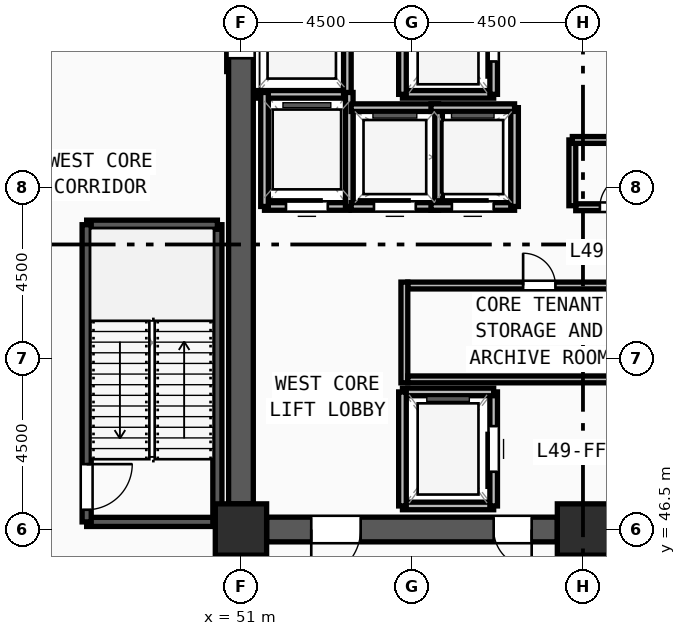
"""IFC4 building model, lengths in metres.
Left out: names, types, materials, properties, quantities, classifications, styles, units other than length and angle.
Written with IfcOpenShell. Run it as: python <this file> out.ifc"""

import sys

from ifc_helpers import new_model, si_unit, direction, frame, frame_2d, origin, origin_2d, place, context, subcontext, project, spatial, rectangle, extrude, source, transform, mapped, element, fill, save


model = new_model("IFC4")
c1 = context("Model", 3, precision=1e-05, world=origin(), true_north=direction((0.0, 1.0)))
c2 = subcontext(c1, "Body", "Model", "MODEL_VIEW")
j1 = project(units=[si_unit("LENGTHUNIT", "METRE"), si_unit("PLANEANGLEUNIT", "RADIAN")], contexts=[c1])
p1 = place(None, origin())
s1 = spatial("IfcSite", under=j1, at=p1, CompositionType="ELEMENT")
p2 = place(p1, origin())
s2 = spatial("IfcBuilding", under=s1, at=p2, CompositionType="ELEMENT")
p3 = place(p2, frame((0.0, 0.0, 189.75)))
s3 = spatial("IfcBuildingStorey", under=s2, at=p3, CompositionType="ELEMENT", Elevation=189.75)
m1 = source(origin(), c2, "Body", "SweptSolid", [
    extrude(rectangle(XDim=1.35, YDim=1.35, at=origin_2d()), origin(), (0.0, 0.0, 1.0), 4.5),
])
for number, where, z_axis, x_axis in (
    (1, (51.0, 46.5, 0.0), (0.0, 0.0, 1.0), (1.0, 0.0, 0.0)),
    (2, (60.0, 46.5, 0.0), (0.0, 0.0, 1.0), (1.0, 0.0, 0.0)),
):
    element("IfcColumn", number, at=place(p3, frame(where, z_axis=z_axis, x_axis=x_axis)), inside=s3, PredefinedType="COLUMN", context=c2, shape_type="MappedRepresentation", body=[
        mapped(m1, transform((0.0, 0.0, 0.0), x_axis=(1.0, 0.0, 0.0), y_axis=(0.0, 1.0, 0.0), z_axis=(0.0, 0.0, 1.0), scale=1.0)),
    ])
p4 = place(p3, frame((59.325, 46.5, 0.0), z_axis=(0.0, 0.0, 1.0), x_axis=(-1.0, 0.0, 0.0)))
e3 = element("IfcWall", 3, at=p4, inside=s3, PredefinedType="SHEAR", context=c2, shape_type="SweptSolid", body=[
    extrude(rectangle(XDim=7.65, YDim=0.65, at=frame_2d((3.825, 0.0))), origin(), (0.0, 0.0, 1.0), 4.32),
])
m2 = source(origin(), c2, "Body", "SweptSolid", [
    extrude(rectangle(XDim=1.3, YDim=2.2, at=frame_2d((0.65, 1.1))), frame((0.0, 0.335, 0.0), z_axis=(0.0, -1.0, 0.0), x_axis=(1.0, 0.0, 0.0)), (0.0, 0.0, 1.0), 0.67),
])
p5 = place(p4, frame((5.175, 0.0, 0.0)))
e4 = element("IfcOpeningElement", 4, at=p5, cuts=e3, PredefinedType="OPENING", context=c2, shape_type="MappedRepresentation", body=[
    mapped(m2, transform((0.0, 0.0, 0.0), x_axis=(1.0, 0.0, 0.0), y_axis=(0.0, 1.0, 0.0), z_axis=(0.0, 0.0, 1.0), scale=1.0)),
])
m3 = source(origin(), c2, "Body", "SweptSolid", [
    extrude(rectangle(XDim=1.0, YDim=2.2, at=frame_2d((0.5, 1.1))), frame((0.0, 0.335, 0.0), z_axis=(0.0, -1.0, 0.0), x_axis=(1.0, 0.0, 0.0)), (0.0, 0.0, 1.0), 0.67),
])
p6 = place(p4, frame((0.675, 0.0, 0.0)))
e5 = element("IfcOpeningElement", 5, at=p6, cuts=e3, PredefinedType="OPENING", context=c2, shape_type="MappedRepresentation", body=[
    mapped(m3, transform((0.0, 0.0, 0.0), x_axis=(1.0, 0.0, 0.0), y_axis=(0.0, 1.0, 0.0), z_axis=(0.0, 0.0, 1.0), scale=1.0)),
])
p7 = place(p3, frame((51.0, 47.175, 0.0), z_axis=(0.0, 0.0, 1.0), x_axis=(0.0, 1.0, 0.0)))
e6 = element("IfcWall", 6, at=p7, inside=s3, PredefinedType="SHEAR", context=c2, shape_type="SweptSolid", body=[
    extrude(rectangle(XDim=13.65, YDim=0.65, at=frame_2d((6.825, 0.0))), origin(), (0.0, 0.0, 1.0), 4.32),
])
m4 = source(origin(), c2, "Body", "SweptSolid", [
    extrude(rectangle(XDim=1.1, YDim=2.2, at=frame_2d((0.55, 1.1))), frame((0.0, 0.335, 0.0), z_axis=(0.0, -1.0, 0.0), x_axis=(1.0, 0.0, 0.0)), (0.0, 0.0, 1.0), 0.67),
])
p8 = place(p7, frame((11.725, 0.0, 0.0)))
e7 = element("IfcOpeningElement", 7, at=p8, cuts=e6, PredefinedType="OPENING", context=c2, shape_type="MappedRepresentation", body=[
    mapped(m4, transform((0.0, 0.0, 0.0), x_axis=(1.0, 0.0, 0.0), y_axis=(0.0, 1.0, 0.0), z_axis=(0.0, 0.0, 1.0), scale=1.0)),
])
p9 = place(p3, frame((46.94, 46.7, 0.0), z_axis=(0.0, 0.0, 1.0), x_axis=(1.0, 0.0, 0.0)))
e8 = element("IfcWall", 8, at=p9, inside=s3, PredefinedType="SOLIDWALL", context=c2, shape_type="SweptSolid", body=[
    extrude(rectangle(XDim=3.44, YDim=0.24, at=frame_2d((1.72, 0.0))), origin(), (0.0, 0.0, 1.0), 4.32),
])
p10 = place(p3, frame((50.38, 46.7, 0.0), z_axis=(0.0, 0.0, 1.0), x_axis=(0.0, 1.0, 0.0)))
e9 = element("IfcWall", 9, at=p10, inside=s3, PredefinedType="SOLIDWALL", context=c2, shape_type="SweptSolid", body=[
    extrude(rectangle(XDim=7.82, YDim=0.24, at=frame_2d((3.91, 0.0))), origin(), (0.0, 0.0, 1.0), 4.32),
])
p11 = place(p3, frame((50.38, 54.52, 0.0), z_axis=(0.0, 0.0, 1.0), x_axis=(-1.0, 0.0, 0.0)))
e10 = element("IfcWall", 10, at=p11, inside=s3, PredefinedType="SOLIDWALL", context=c2, shape_type="SweptSolid", body=[
    extrude(rectangle(XDim=3.44, YDim=0.24, at=frame_2d((1.72, 0.0))), origin(), (0.0, 0.0, 1.0), 4.32),
])
p12 = place(p3, frame((46.94, 54.52, 0.0), z_axis=(0.0, 0.0, 1.0), x_axis=(0.0, -1.0, 0.0)))
e11 = element("IfcWall", 11, at=p12, inside=s3, PredefinedType="SOLIDWALL", context=c2, shape_type="SweptSolid", body=[
    extrude(rectangle(XDim=7.82, YDim=0.24, at=frame_2d((3.91, 0.0))), origin(), (0.0, 0.0, 1.0), 4.32),
])
m5 = source(origin(), c2, "Body", "SweptSolid", [
    extrude(rectangle(XDim=1.2, YDim=2.2, at=frame_2d((0.6, 1.1))), frame((0.0, 0.13, 0.0), z_axis=(0.0, -1.0, 0.0), x_axis=(1.0, 0.0, 0.0)), (0.0, 0.0, 1.0), 0.26),
])
p13 = place(p12, frame((6.3, 0.0, 0.0)))
e12 = element("IfcOpeningElement", 12, at=p13, cuts=e11, PredefinedType="OPENING", context=c2, shape_type="MappedRepresentation", body=[
    mapped(m5, transform((0.0, 0.0, 0.0), x_axis=(1.0, 0.0, 0.0), y_axis=(0.0, 1.0, 0.0), z_axis=(0.0, 0.0, 1.0), scale=1.0)),
])
p14 = place(p3, frame((55.25, 47.12, 0.0), z_axis=(0.0, 0.0, 1.0), x_axis=(1.0, 0.0, 0.0)))
e13 = element("IfcWall", 13, at=p14, inside=s3, PredefinedType="SOLIDWALL", context=c2, shape_type="SweptSolid", body=[
    extrude(rectangle(XDim=2.4, YDim=0.2, at=frame_2d((1.2, 0.0))), origin(), (0.0, 0.0, 1.0), 4.32),
])
p15 = place(p3, frame((57.65, 47.12, 0.0), z_axis=(0.0, 0.0, 1.0), x_axis=(0.0, 1.0, 0.0)))
e14 = element("IfcWall", 14, at=p15, inside=s3, PredefinedType="SOLIDWALL", context=c2, shape_type="SweptSolid", body=[
    extrude(rectangle(XDim=3.0, YDim=0.2, at=frame_2d((1.5, 0.0))), origin(), (0.0, 0.0, 1.0), 4.32),
])
m6 = source(origin(), c2, "Body", "SweptSolid", [
    extrude(rectangle(XDim=1.2, YDim=2.3, at=frame_2d((0.6, 1.15))), frame((0.0, 0.11, 0.0), z_axis=(0.0, -1.0, 0.0), x_axis=(1.0, 0.0, 0.0)), (0.0, 0.0, 1.0), 0.22),
])
p16 = place(p15, frame((0.9, 0.0, 0.0)))
e15 = element("IfcOpeningElement", 15, at=p16, cuts=e14, PredefinedType="OPENING", context=c2, shape_type="MappedRepresentation", body=[
    mapped(m6, transform((0.0, 0.0, 0.0), x_axis=(1.0, 0.0, 0.0), y_axis=(0.0, 1.0, 0.0), z_axis=(0.0, 0.0, 1.0), scale=1.0)),
])
p17 = place(p3, frame((57.65, 50.12, 0.0), z_axis=(0.0, 0.0, 1.0), x_axis=(-1.0, 0.0, 0.0)))
e16 = element("IfcWall", 16, at=p17, inside=s3, PredefinedType="SOLIDWALL", context=c2, shape_type="SweptSolid", body=[
    extrude(rectangle(XDim=2.4, YDim=0.2, at=frame_2d((1.2, 0.0))), origin(), (0.0, 0.0, 1.0), 4.32),
])
p18 = place(p3, frame((55.25, 50.12, 0.0), z_axis=(0.0, 0.0, 1.0), x_axis=(0.0, -1.0, 0.0)))
e17 = element("IfcWall", 17, at=p18, inside=s3, PredefinedType="SOLIDWALL", context=c2, shape_type="SweptSolid", body=[
    extrude(rectangle(XDim=3.0, YDim=0.2, at=frame_2d((1.5, 0.0))), origin(), (0.0, 0.0, 1.0), 4.32),
])
p19 = place(p3, frame((55.25, 57.95, 0.0), z_axis=(0.0, 0.0, 1.0), x_axis=(1.0, 0.0, 0.0)))
e18 = element("IfcWall", 18, at=p19, inside=s3, PredefinedType="SOLIDWALL", context=c2, shape_type="SweptSolid", body=[
    extrude(rectangle(XDim=2.4, YDim=0.2, at=frame_2d((1.2, 0.0))), origin(), (0.0, 0.0, 1.0), 4.32),
])
p20 = place(p3, frame((57.65, 57.95, 0.0), z_axis=(0.0, 0.0, 1.0), x_axis=(0.0, 1.0, 0.0)))
e19 = element("IfcWall", 19, at=p20, inside=s3, PredefinedType="SOLIDWALL", context=c2, shape_type="SweptSolid", body=[
    extrude(rectangle(XDim=2.93, YDim=0.2, at=frame_2d((1.465, 0.0))), origin(), (0.0, 0.0, 1.0), 4.32),
])
p21 = place(p20, frame((0.865, 0.0, 0.0)))
e20 = element("IfcOpeningElement", 20, at=p21, cuts=e19, PredefinedType="OPENING", context=c2, shape_type="MappedRepresentation", body=[
    mapped(m6, transform((0.0, 0.0, 0.0), x_axis=(1.0, 0.0, 0.0), y_axis=(0.0, 1.0, 0.0), z_axis=(0.0, 0.0, 1.0), scale=1.0)),
])
p22 = place(p3, frame((55.25, 60.88, 0.0), z_axis=(0.0, 0.0, 1.0), x_axis=(0.0, -1.0, 0.0)))
e21 = element("IfcWall", 21, at=p22, inside=s3, PredefinedType="SOLIDWALL", context=c2, shape_type="SweptSolid", body=[
    extrude(rectangle(XDim=2.93, YDim=0.2, at=frame_2d((1.465, 0.0))), origin(), (0.0, 0.0, 1.0), 4.32),
])
p23 = place(p3, frame((51.4, 57.95, 0.0), z_axis=(0.0, 0.0, 1.0), x_axis=(1.0, 0.0, 0.0)))
e22 = element("IfcWall", 22, at=p23, inside=s3, PredefinedType="SOLIDWALL", context=c2, shape_type="SweptSolid", body=[
    extrude(rectangle(XDim=2.4, YDim=0.2, at=frame_2d((1.2, 0.0))), origin(), (0.0, 0.0, 1.0), 4.32),
])
p24 = place(p3, frame((53.8, 57.95, 0.0), z_axis=(0.0, 0.0, 1.0), x_axis=(0.0, 1.0, 0.0)))
e23 = element("IfcWall", 23, at=p24, inside=s3, PredefinedType="SOLIDWALL", context=c2, shape_type="SweptSolid", body=[
    extrude(rectangle(XDim=2.93, YDim=0.2, at=frame_2d((1.465, 0.0))), origin(), (0.0, 0.0, 1.0), 4.32),
])
p25 = place(p3, frame((51.62, 55.0, 0.0), z_axis=(0.0, 0.0, 1.0), x_axis=(1.0, 0.0, 0.0)))
e24 = element("IfcWall", 24, at=p25, inside=s3, PredefinedType="SOLIDWALL", context=c2, shape_type="SweptSolid", body=[
    extrude(rectangle(XDim=2.23, YDim=0.2, at=frame_2d((1.115, 0.0))), origin(), (0.0, 0.0, 1.0), 4.32),
])
m7 = source(origin(), c2, "Body", "SweptSolid", [
    extrude(rectangle(XDim=1.1, YDim=2.2, at=frame_2d((0.55, 1.1))), frame((0.0, 0.11, 0.0), z_axis=(0.0, -1.0, 0.0), x_axis=(1.0, 0.0, 0.0)), (0.0, 0.0, 1.0), 0.22),
])
p26 = place(p25, frame((0.565, 0.0, 0.0)))
e25 = element("IfcOpeningElement", 25, at=p26, cuts=e24, PredefinedType="OPENING", context=c2, shape_type="MappedRepresentation", body=[
    mapped(m7, transform((0.0, 0.0, 0.0), x_axis=(1.0, 0.0, 0.0), y_axis=(0.0, 1.0, 0.0), z_axis=(0.0, 0.0, 1.0), scale=1.0)),
])
for number, where, z_axis, x_axis in (
    (26, (53.85, 55.0, 0.0), (0.0, 0.0, 1.0), (0.0, 1.0, 0.0)),
    (27, (51.62, 58.0, 0.0), (0.0, 0.0, 1.0), (0.0, -1.0, 0.0)),
):
    element("IfcWall", number, at=place(p3, frame(where, z_axis=z_axis, x_axis=x_axis)), inside=s3, PredefinedType="SOLIDWALL", context=c2, shape_type="SweptSolid", body=[
        extrude(rectangle(XDim=3.0, YDim=0.2, at=frame_2d((1.5, 0.0))), origin(), (0.0, 0.0, 1.0), 4.32),
    ])
p27 = place(p3, frame((53.9, 55.0, 0.0), z_axis=(0.0, 0.0, 1.0), x_axis=(1.0, 0.0, 0.0)))
e28 = element("IfcWall", 28, at=p27, inside=s3, PredefinedType="SOLIDWALL", context=c2, shape_type="SweptSolid", body=[
    extrude(rectangle(XDim=2.3, YDim=0.2, at=frame_2d((1.15, 0.0))), origin(), (0.0, 0.0, 1.0), 4.32),
])
p28 = place(p27, frame((0.6, 0.0, 0.0)))
e29 = element("IfcOpeningElement", 29, at=p28, cuts=e28, PredefinedType="OPENING", context=c2, shape_type="MappedRepresentation", body=[
    mapped(m7, transform((0.0, 0.0, 0.0), x_axis=(1.0, 0.0, 0.0), y_axis=(0.0, 1.0, 0.0), z_axis=(0.0, 0.0, 1.0), scale=1.0)),
])
p29 = place(p3, frame((56.2, 55.0, 0.0), z_axis=(0.0, 0.0, 1.0), x_axis=(0.0, 1.0, 0.0)))
e30 = element("IfcWall", 30, at=p29, inside=s3, PredefinedType="SOLIDWALL", context=c2, shape_type="SweptSolid", body=[
    extrude(rectangle(XDim=2.6, YDim=0.2, at=frame_2d((1.3, 0.0))), origin(), (0.0, 0.0, 1.0), 4.32),
])
p30 = place(p3, frame((56.2, 57.6, 0.0), z_axis=(0.0, 0.0, 1.0), x_axis=(-1.0, 0.0, 0.0)))
e31 = element("IfcWall", 31, at=p30, inside=s3, PredefinedType="SOLIDWALL", context=c2, shape_type="SweptSolid", body=[
    extrude(rectangle(XDim=2.3, YDim=0.2, at=frame_2d((1.15, 0.0))), origin(), (0.0, 0.0, 1.0), 4.32),
])
p31 = place(p3, frame((56.0, 55.0, 0.0), z_axis=(0.0, 0.0, 1.0), x_axis=(1.0, 0.0, 0.0)))
e32 = element("IfcWall", 32, at=p31, inside=s3, PredefinedType="SOLIDWALL", context=c2, shape_type="SweptSolid", body=[
    extrude(rectangle(XDim=2.2, YDim=0.2, at=frame_2d((1.1, 0.0))), origin(), (0.0, 0.0, 1.0), 4.32),
])
p32 = place(p31, frame((0.55, 0.0, 0.0)))
e33 = element("IfcOpeningElement", 33, at=p32, cuts=e32, PredefinedType="OPENING", context=c2, shape_type="MappedRepresentation", body=[
    mapped(m7, transform((0.0, 0.0, 0.0), x_axis=(1.0, 0.0, 0.0), y_axis=(0.0, 1.0, 0.0), z_axis=(0.0, 0.0, 1.0), scale=1.0)),
])
p33 = place(p3, frame((58.2, 55.0, 0.0), z_axis=(0.0, 0.0, 1.0), x_axis=(0.0, 1.0, 0.0)))
e34 = element("IfcWall", 34, at=p33, inside=s3, PredefinedType="SOLIDWALL", context=c2, shape_type="SweptSolid", body=[
    extrude(rectangle(XDim=2.6, YDim=0.2, at=frame_2d((1.3, 0.0))), origin(), (0.0, 0.0, 1.0), 4.32),
])
p34 = place(p3, frame((58.2, 57.6, 0.0), z_axis=(0.0, 0.0, 1.0), x_axis=(-1.0, 0.0, 0.0)))
e35 = element("IfcWall", 35, at=p34, inside=s3, PredefinedType="SOLIDWALL", context=c2, shape_type="SweptSolid", body=[
    extrude(rectangle(XDim=2.2, YDim=0.2, at=frame_2d((1.1, 0.0))), origin(), (0.0, 0.0, 1.0), 4.32),
])
p35 = place(p3, frame((55.39, 52.92, 0.0), z_axis=(0.0, 0.0, 1.0), x_axis=(1.0, 0.0, 0.0)))
e36 = element("IfcWall", 36, at=p35, inside=s3, PredefinedType="PARTITIONING", context=c2, shape_type="SweptSolid", body=[
    extrude(rectangle(XDim=6.91, YDim=0.18, at=frame_2d((3.455, 0.0))), origin(), (0.0, 0.0, 1.0), 4.32),
])
m8 = source(origin(), c2, "Body", "SweptSolid", [
    extrude(rectangle(XDim=0.85, YDim=2.1, at=frame_2d((0.425, 1.05))), frame((0.0, 0.1, 0.0), z_axis=(0.0, -1.0, 0.0), x_axis=(1.0, 0.0, 0.0)), (0.0, 0.0, 1.0), 0.2),
])
p36 = place(p35, frame((3.035, 0.0, 0.0)))
e37 = element("IfcOpeningElement", 37, at=p36, cuts=e36, PredefinedType="OPENING", context=c2, shape_type="MappedRepresentation", body=[
    mapped(m8, transform((0.0, 0.0, 0.0), x_axis=(1.0, 0.0, 0.0), y_axis=(0.0, 1.0, 0.0), z_axis=(0.0, 0.0, 1.0), scale=1.0)),
])
p37 = place(p3, frame((59.81, 54.98, 0.0), z_axis=(0.0, 0.0, 1.0), x_axis=(1.0, 0.0, 0.0)))
e38 = element("IfcWall", 38, at=p37, inside=s3, PredefinedType="PARTITIONING", context=c2, shape_type="SweptSolid", body=[
    extrude(rectangle(XDim=2.09, YDim=0.18, at=frame_2d((1.045, 0.0))), origin(), (0.0, 0.0, 1.0), 4.32),
])
p38 = place(p37, frame((0.635, 0.0, 0.0)))
e39 = element("IfcOpeningElement", 39, at=p38, cuts=e38, PredefinedType="OPENING", context=c2, shape_type="MappedRepresentation", body=[
    mapped(m8, transform((0.0, 0.0, 0.0), x_axis=(1.0, 0.0, 0.0), y_axis=(0.0, 1.0, 0.0), z_axis=(0.0, 0.0, 1.0), scale=1.0)),
])
p39 = place(p3, frame((59.72, 55.02, 0.0), z_axis=(0.0, 0.0, 1.0), x_axis=(0.0, 1.0, 0.0)))
e40 = element("IfcWall", 40, at=p39, inside=s3, PredefinedType="PARTITIONING", context=c2, shape_type="SweptSolid", body=[
    extrude(rectangle(XDim=1.73, YDim=0.18, at=frame_2d((0.865, 0.0))), origin(), (0.0, 0.0, 1.0), 4.32),
])
p40 = place(p3, frame((59.72, 56.75, 0.0), z_axis=(0.0, 0.0, 1.0), x_axis=(1.0, 0.0, 0.0)))
e41 = element("IfcWall", 41, at=p40, inside=s3, PredefinedType="PARTITIONING", context=c2, shape_type="SweptSolid", body=[
    extrude(rectangle(XDim=2.29, YDim=0.18, at=frame_2d((1.145, 0.0))), origin(), (0.0, 0.0, 1.0), 4.32),
])
p41 = place(p3, frame((55.3, 50.36, 0.0), z_axis=(0.0, 0.0, 1.0), x_axis=(0.0, 1.0, 0.0)))
e42 = element("IfcWall", 42, at=p41, inside=s3, PredefinedType="PARTITIONING", context=c2, shape_type="SweptSolid", body=[
    extrude(rectangle(XDim=2.65, YDim=0.18, at=frame_2d((1.325, 0.0))), origin(), (0.0, 0.0, 1.0), 4.32),
])
p42 = place(p3, frame((55.39, 50.45, 0.0), z_axis=(0.0, 0.0, 1.0), x_axis=(1.0, 0.0, 0.0)))
e43 = element("IfcWall", 43, at=p42, inside=s3, PredefinedType="PARTITIONING", context=c2, shape_type="SweptSolid", body=[
    extrude(rectangle(XDim=6.91, YDim=0.18, at=frame_2d((3.455, 0.0))), origin(), (0.0, 0.0, 1.0), 4.32),
])
m9 = source(origin(), c2, "Body", "SweptSolid", [
    extrude(rectangle(XDim=1.3, YDim=2.2, at=frame_2d((0.65, 1.1))), frame((0.0, 0.025, 0.0), z_axis=(0.0, -1.0, 0.0), x_axis=(1.0, 0.0, 0.0)), (0.0, 0.0, 1.0), 0.05),
])
p43 = place(p5, origin())
e44 = element("IfcDoor", 44, at=p43, inside=s3, OperationType="SINGLE_SWING_RIGHT", PredefinedType="DOOR", context=c2, shape_type="MappedRepresentation", body=[
    mapped(m9, transform((0.0, 0.0, 0.0), x_axis=(1.0, 0.0, 0.0), y_axis=(0.0, 1.0, 0.0), z_axis=(0.0, 0.0, 1.0), scale=1.0)),
])
fill(e4, e44)
m10 = source(origin(), c2, "Body", "SweptSolid", [
    extrude(rectangle(XDim=1.0, YDim=2.2, at=frame_2d((0.5, 1.1))), frame((0.0, 0.025, 0.0), z_axis=(0.0, -1.0, 0.0), x_axis=(1.0, 0.0, 0.0)), (0.0, 0.0, 1.0), 0.05),
])
p44 = place(p6, origin())
e45 = element("IfcDoor", 45, at=p44, inside=s3, OperationType="SINGLE_SWING_LEFT", PredefinedType="DOOR", context=c2, shape_type="MappedRepresentation", body=[
    mapped(m10, transform((0.0, 0.0, 0.0), x_axis=(1.0, 0.0, 0.0), y_axis=(0.0, 1.0, 0.0), z_axis=(0.0, 0.0, 1.0), scale=1.0)),
])
fill(e5, e45)
m11 = source(origin(), c2, "Body", "SweptSolid", [
    extrude(rectangle(XDim=1.2, YDim=2.2, at=frame_2d((0.6, 1.1))), frame((0.0, 0.025, 0.0), z_axis=(0.0, -1.0, 0.0), x_axis=(1.0, 0.0, 0.0)), (0.0, 0.0, 1.0), 0.05),
])
p45 = place(p13, origin())
e46 = element("IfcDoor", 46, at=p45, inside=s3, OperationType="SINGLE_SWING_LEFT", PredefinedType="DOOR", context=c2, shape_type="MappedRepresentation", body=[
    mapped(m11, transform((0.0, 0.0, 0.0), x_axis=(1.0, 0.0, 0.0), y_axis=(0.0, 1.0, 0.0), z_axis=(0.0, 0.0, 1.0), scale=1.0)),
])
fill(e12, e46)
m12 = source(origin(), c2, "Body", "SweptSolid", [
    extrude(rectangle(XDim=1.2, YDim=2.3, at=frame_2d((0.6, 1.15))), frame((0.0, 0.025, 0.0), z_axis=(0.0, -1.0, 0.0), x_axis=(1.0, 0.0, 0.0)), (0.0, 0.0, 1.0), 0.05),
])
p46 = place(p16, origin())
e47 = element("IfcDoor", 47, at=p46, inside=s3, OperationType="SLIDING_TO_LEFT", PredefinedType="DOOR", context=c2, shape_type="MappedRepresentation", body=[
    mapped(m12, transform((0.0, 0.0, 0.0), x_axis=(1.0, 0.0, 0.0), y_axis=(0.0, 1.0, 0.0), z_axis=(0.0, 0.0, 1.0), scale=1.0)),
])
fill(e15, e47)
p47 = place(p21, origin())
e48 = element("IfcDoor", 48, at=p47, inside=s3, OperationType="SLIDING_TO_LEFT", PredefinedType="DOOR", context=c2, shape_type="MappedRepresentation", body=[
    mapped(m12, transform((0.0, 0.0, 0.0), x_axis=(1.0, 0.0, 0.0), y_axis=(0.0, 1.0, 0.0), z_axis=(0.0, 0.0, 1.0), scale=1.0)),
])
fill(e20, e48)
m13 = source(origin(), c2, "Body", "SweptSolid", [
    extrude(rectangle(XDim=1.1, YDim=2.2, at=frame_2d((0.55, 1.1))), frame((0.0, 0.025, 0.0), z_axis=(0.0, -1.0, 0.0), x_axis=(1.0, 0.0, 0.0)), (0.0, 0.0, 1.0), 0.05),
])
p48 = place(p8, origin())
e49 = element("IfcDoor", 49, at=p48, inside=s3, OperationType="SLIDING_TO_LEFT", PredefinedType="DOOR", context=c2, shape_type="MappedRepresentation", body=[
    mapped(m13, transform((0.0, 0.0, 0.0), x_axis=(1.0, 0.0, 0.0), y_axis=(0.0, 1.0, 0.0), z_axis=(0.0, 0.0, 1.0), scale=1.0)),
])
fill(e7, e49)
p49 = place(p26, origin())
e50 = element("IfcDoor", 50, at=p49, inside=s3, OperationType="SLIDING_TO_LEFT", PredefinedType="DOOR", context=c2, shape_type="MappedRepresentation", body=[
    mapped(m13, transform((0.0, 0.0, 0.0), x_axis=(1.0, 0.0, 0.0), y_axis=(0.0, 1.0, 0.0), z_axis=(0.0, 0.0, 1.0), scale=1.0)),
])
fill(e25, e50)
p50 = place(p28, origin())
e51 = element("IfcDoor", 51, at=p50, inside=s3, OperationType="SLIDING_TO_LEFT", PredefinedType="DOOR", context=c2, shape_type="MappedRepresentation", body=[
    mapped(m13, transform((0.0, 0.0, 0.0), x_axis=(1.0, 0.0, 0.0), y_axis=(0.0, 1.0, 0.0), z_axis=(0.0, 0.0, 1.0), scale=1.0)),
])
fill(e29, e51)
p51 = place(p32, origin())
e52 = element("IfcDoor", 52, at=p51, inside=s3, OperationType="SLIDING_TO_LEFT", PredefinedType="DOOR", context=c2, shape_type="MappedRepresentation", body=[
    mapped(m13, transform((0.0, 0.0, 0.0), x_axis=(1.0, 0.0, 0.0), y_axis=(0.0, 1.0, 0.0), z_axis=(0.0, 0.0, 1.0), scale=1.0)),
])
fill(e33, e52)
m14 = source(origin(), c2, "Body", "SweptSolid", [
    extrude(rectangle(XDim=0.85, YDim=2.1, at=frame_2d((0.425, 1.05))), frame((0.0, 0.025, 0.0), z_axis=(0.0, -1.0, 0.0), x_axis=(1.0, 0.0, 0.0)), (0.0, 0.0, 1.0), 0.05),
])
p52 = place(p36, origin())
e53 = element("IfcDoor", 53, at=p52, inside=s3, OperationType="SINGLE_SWING_LEFT", PredefinedType="DOOR", context=c2, shape_type="MappedRepresentation", body=[
    mapped(m14, transform((0.0, 0.0, 0.0), x_axis=(1.0, 0.0, 0.0), y_axis=(0.0, 1.0, 0.0), z_axis=(0.0, 0.0, 1.0), scale=1.0)),
])
fill(e37, e53)
p53 = place(p38, origin())
e54 = element("IfcDoor", 54, at=p53, inside=s3, OperationType="SINGLE_SWING_RIGHT", PredefinedType="DOOR", context=c2, shape_type="MappedRepresentation", body=[
    mapped(m14, transform((0.0, 0.0, 0.0), x_axis=(1.0, 0.0, 0.0), y_axis=(0.0, 1.0, 0.0), z_axis=(0.0, 0.0, 1.0), scale=1.0)),
])
fill(e39, e54)
save(model, sys.argv[1])
